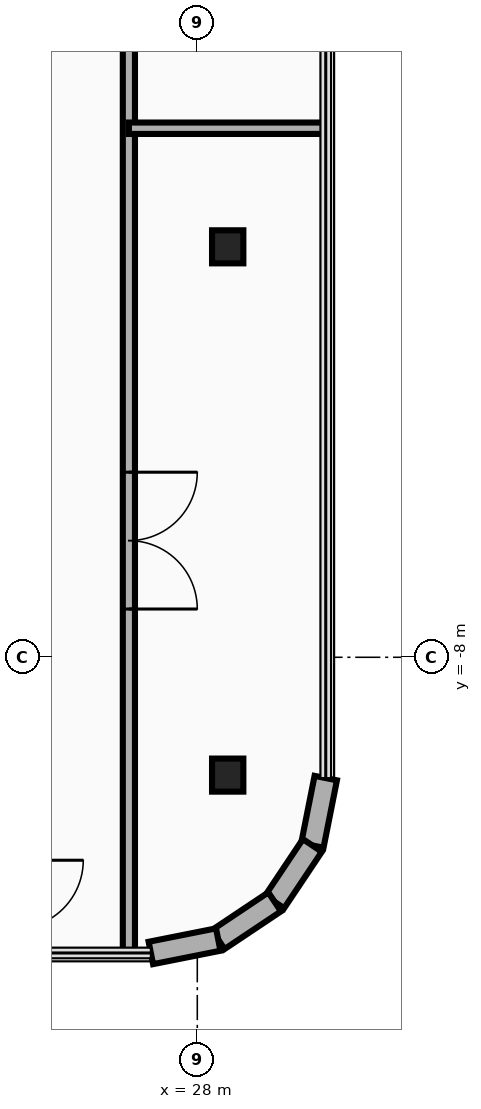
"""IFC4 building model, lengths in metres.
Left out: names, types, materials, properties, quantities, classifications, styles, units other than length and angle.
Written with IfcOpenShell. Run it as: python <this file> out.ifc"""

import sys

from ifc_helpers import new_model, si_unit, direction, frame, frame_2d, origin, origin_2d, place, context, subcontext, project, spatial, rectangle, i_section, extrude, source, transform, mapped, element, fill, save


model = new_model("IFC4")
c1 = context("Model", 3, precision=1e-05, world=origin(), true_north=direction((0.0, 1.0)))
c2 = subcontext(c1, "Body", "Model", "MODEL_VIEW")
j1 = project(units=[si_unit("LENGTHUNIT", "METRE"), si_unit("PLANEANGLEUNIT", "RADIAN")], contexts=[c1])
p1 = place(None, origin())
s1 = spatial("IfcSite", under=j1, at=p1, CompositionType="ELEMENT")
p2 = place(p1, origin())
s2 = spatial("IfcBuilding", under=s1, at=p2, CompositionType="ELEMENT")
p3 = place(p2, frame((0.0, 0.0, 184.45)))
s3 = spatial("IfcBuildingStorey", under=s2, at=p3, CompositionType="ELEMENT", Elevation=184.45)
m1 = source(origin(), c2, "Body", "SweptSolid", [
    extrude(i_section(OverallWidth=0.412, OverallDepth=0.435, WebThickness=0.036, FlangeThickness=0.057, at=origin_2d()), origin(), (0.0, 0.0, 1.0), 3.95),
])
for number, where, z_axis, x_axis in (
    (1, (28.4, -9.55, 0.0), (0.0, 0.0, 1.0), (1.0, 0.0, 0.0)),
    (2, (28.4, -2.6, 0.0), (0.0, 0.0, 1.0), (1.0, 0.0, 0.0)),
):
    element("IfcColumn", number, at=place(p3, frame(where, z_axis=z_axis, x_axis=x_axis)), inside=s3, PredefinedType="COLUMN", context=c2, shape_type="MappedRepresentation", body=[
        mapped(m1, transform((0.0, 0.0, 0.0), x_axis=(1.0, 0.0, 0.0), y_axis=(0.0, 1.0, 0.0), z_axis=(0.0, 0.0, 1.0), scale=1.0)),
    ])
p4 = place(p3, frame((29.69, -9.589, 0.0), z_axis=(0.0, 0.0, 1.0), x_axis=(-0.195025152871, -0.980798241101, 0.0)))
e3 = element("IfcWall", 3, at=p4, inside=s3, PredefinedType="SOLIDWALL", context=c2, shape_type="SweptSolid", body=[
    extrude(rectangle(XDim=0.904, YDim=0.3, at=frame_2d((0.452, 0.0))), origin(), (0.0, 0.0, 1.0), 3.63),
])
p5 = place(p3, frame((29.514, -10.476, 0.0), z_axis=(0.0, 0.0, 1.0), x_axis=(-0.555520488502, -0.831502848374, 0.0)))
e4 = element("IfcWall", 4, at=p5, inside=s3, PredefinedType="SOLIDWALL", context=c2, shape_type="SweptSolid", body=[
    extrude(rectangle(XDim=0.893, YDim=0.3, at=frame_2d((0.446, 0.0))), origin(), (0.0, 0.0, 1.0), 3.63),
])
p6 = place(p3, frame((29.018, -11.218, 0.0), z_axis=(0.0, 0.0, 1.0), x_axis=(-0.83158722889, -0.555394167009, 0.0)))
e5 = element("IfcWall", 5, at=p6, inside=s3, PredefinedType="SOLIDWALL", context=c2, shape_type="SweptSolid", body=[
    extrude(rectangle(XDim=0.893, YDim=0.3, at=frame_2d((0.446, 0.0))), origin(), (0.0, 0.0, 1.0), 3.63),
])
p7 = place(p3, frame((28.275, -11.714, 0.0), z_axis=(0.0, 0.0, 1.0), x_axis=(-0.980787963133, -0.19507683454, 0.0)))
e6 = element("IfcWall", 6, at=p7, inside=s3, PredefinedType="SOLIDWALL", context=c2, shape_type="SweptSolid", body=[
    extrude(rectangle(XDim=0.904, YDim=0.3, at=frame_2d((0.452, 0.0))), origin(), (0.0, 0.0, 1.0), 3.63),
])
p8 = place(p3, frame((27.1, -11.89, 0.0), z_axis=(0.0, 0.0, 1.0), x_axis=(0.0, 1.0, 0.0)))
e7 = element("IfcWall", 7, at=p8, inside=s3, PredefinedType="PARTITIONING", context=c2, shape_type="SweptSolid", body=[
    extrude(rectangle(XDim=24.81, YDim=0.16, at=frame_2d((12.405, 0.0))), origin(), (0.0, 0.0, 1.0), 2.665),
])
p9 = place(p8, frame((4.525, 0.0, 0.0)))
e8 = element("IfcOpeningElement", 8, at=p9, cuts=e7, PredefinedType="OPENING", context=c2, shape_type="SweptSolid", body=[
    extrude(rectangle(XDim=1.8, YDim=2.15, at=frame_2d((0.9, 1.075))), frame((0.0, 0.095, 0.0), z_axis=(0.0, -1.0, 0.0), x_axis=(1.0, 0.0, 0.0)), (0.0, 0.0, 1.0), 0.19),
])
p10 = place(p8, frame((16.93, 0.0, 0.0)))
e9 = element("IfcOpeningElement", 9, at=p10, cuts=e7, PredefinedType="OPENING", context=c2, shape_type="SweptSolid", body=[
    extrude(rectangle(XDim=1.8, YDim=2.15, at=frame_2d((0.9, 1.075))), frame((0.0, 0.095, 0.0), z_axis=(0.0, -1.0, 0.0), x_axis=(1.0, 0.0, 0.0)), (0.0, 0.0, 1.0), 0.19),
])
p11 = place(p3, frame((27.1, -1.04, 0.0), z_axis=(0.0, 0.0, 1.0), x_axis=(1.0, 0.0, 0.0)))
e10 = element("IfcWall", 10, at=p11, inside=s3, PredefinedType="PARTITIONING", context=c2, shape_type="SweptSolid", body=[
    extrude(rectangle(XDim=2.59, YDim=0.15, at=frame_2d((1.295, 0.0))), origin(), (0.0, 0.0, 1.0), 3.076),
])
p12 = place(p9, frame((1.8, 0.0, 0.0), z_axis=(0.0, 0.0, 1.0), x_axis=(-1.0, 0.0, 0.0)))
e11 = element("IfcDoor", 11, at=p12, inside=s3, OperationType="DOUBLE_DOOR_SINGLE_SWING", PredefinedType="DOOR", context=c2, shape_type="SweptSolid", body=[
    extrude(rectangle(XDim=1.8, YDim=2.15, at=frame_2d((0.9, 1.075))), frame((0.0, 0.025, 0.0), z_axis=(0.0, -1.0, 0.0), x_axis=(1.0, 0.0, 0.0)), (0.0, 0.0, 1.0), 0.05),
])
fill(e8, e11)
save(model, sys.argv[1])
